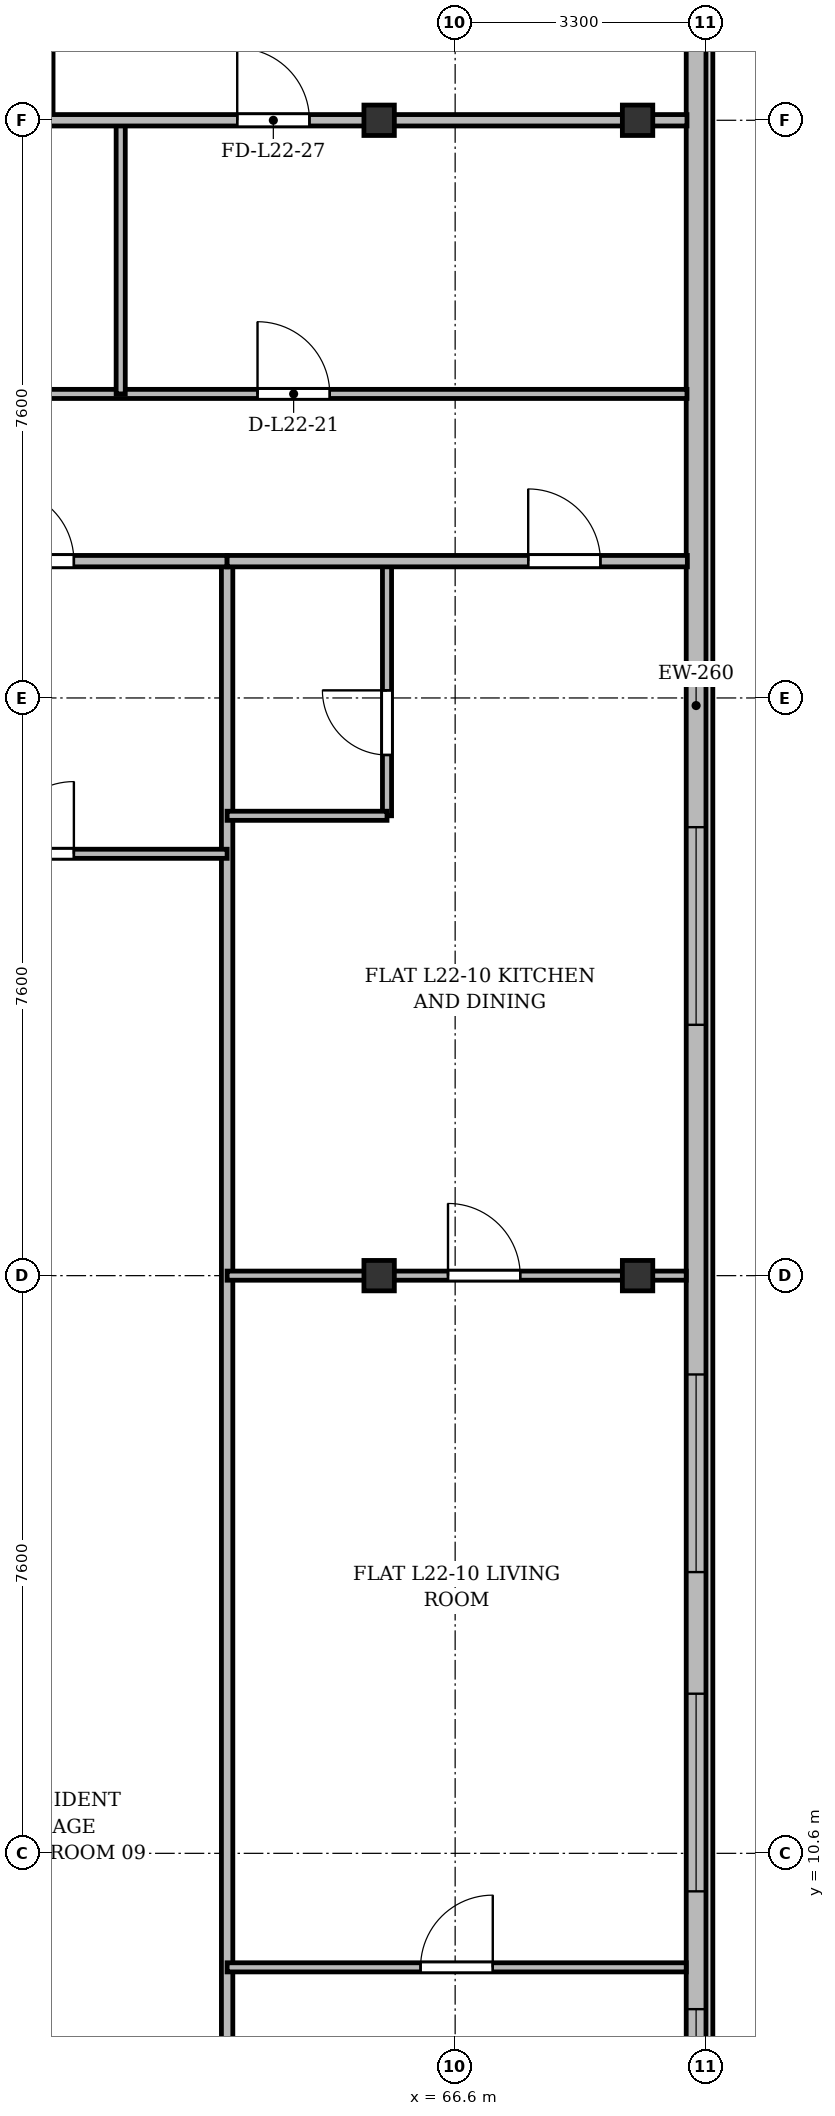
"""IFC4 building model, lengths in metres.
Left out: names, types, materials, properties, quantities, classifications, styles, units other than length and angle.
Written with IfcOpenShell. Run it as: python <this file> out.ifc"""

import sys

from ifc_helpers import new_model, si_unit, direction, frame, frame_2d, origin, origin_2d, place, context, subcontext, project, spatial, rectangle, i_section, extrude, source, transform, mapped, element, fill, save


model = new_model("IFC4")
c1 = context("Model", 3, precision=1e-05, world=origin(), true_north=direction((0.0, 1.0)))
c2 = subcontext(c1, "Body", "Model", "MODEL_VIEW")
j1 = project(units=[si_unit("LENGTHUNIT", "METRE"), si_unit("PLANEANGLEUNIT", "RADIAN")], contexts=[c1])
p1 = place(None, origin())
s1 = spatial("IfcSite", under=j1, at=p1, CompositionType="ELEMENT")
p2 = place(p1, origin())
s2 = spatial("IfcBuilding", under=s1, at=p2, CompositionType="ELEMENT")
p3 = place(p2, frame((0.0, 0.0, 88.9)))
s3 = spatial("IfcBuildingStorey", under=s2, at=p3, CompositionType="ELEMENT", Elevation=88.9)
m1 = source(origin(), c2, "Body", "SweptSolid", [
    extrude(i_section(OverallWidth=0.4, OverallDepth=0.4, WebThickness=0.022, FlangeThickness=0.035, at=origin_2d()), origin(), (0.0, 0.0, 1.0), 3.6),
])
for number, where, z_axis, x_axis in (
    (1, (65.6, 18.2, 0.0), (0.0, 0.0, 1.0), (1.0, 0.0, 0.0)),
    (2, (65.6, 33.4, 0.0), (0.0, 0.0, 1.0), (1.0, 0.0, 0.0)),
    (3, (69.0, 18.2, 0.0), (0.0, 0.0, 1.0), (1.0, 0.0, 0.0)),
    (4, (69.0, 33.4, 0.0), (0.0, 0.0, 1.0), (1.0, 0.0, 0.0)),
):
    element("IfcColumn", number, at=place(p3, frame(where, z_axis=z_axis, x_axis=x_axis)), inside=s3, PredefinedType="COLUMN", context=c2, shape_type="MappedRepresentation", body=[
        mapped(m1, transform((0.0, 0.0, 0.0), x_axis=(1.0, 0.0, 0.0), y_axis=(0.0, 1.0, 0.0), z_axis=(0.0, 0.0, 1.0), scale=1.0)),
    ])
p4 = place(p3, frame((69.77, 45.5, 0.0), z_axis=(0.0, 0.0, 1.0), x_axis=(0.0, -1.0, 0.0)))
e5 = element("IfcWall", 5, at=p4, inside=s3, PredefinedType="SOLIDWALL", context=c2, shape_type="SweptSolid", body=[
    extrude(rectangle(XDim=39.6, YDim=0.26, at=frame_2d((19.8, 0.0))), origin(), (0.0, 0.0, 1.0), 3.34),
])
p5 = place(p4, frame((36.95, 0.0, 0.92)))
e6 = element("IfcOpeningElement", 6, at=p5, cuts=e5, PredefinedType="OPENING", context=c2, shape_type="SweptSolid", body=[
    extrude(rectangle(XDim=1.2, YDim=1.65, at=frame_2d((0.6, 0.825))), frame((0.0, 0.14, 0.0), z_axis=(0.0, -1.0, 0.0), x_axis=(1.0, 0.0, 0.0)), (0.0, 0.0, 1.0), 0.28),
])
p6 = place(p4, frame((32.8, 0.0, 0.92)))
e7 = element("IfcOpeningElement", 7, at=p6, cuts=e5, PredefinedType="OPENING", context=c2, shape_type="SweptSolid", body=[
    extrude(rectangle(XDim=2.6, YDim=1.9, at=frame_2d((1.3, 0.95))), frame((0.0, 0.14, 0.0), z_axis=(0.0, -1.0, 0.0), x_axis=(1.0, 0.0, 0.0)), (0.0, 0.0, 1.0), 0.28),
])
p7 = place(p4, frame((28.6, 0.0, 0.92)))
e8 = element("IfcOpeningElement", 8, at=p7, cuts=e5, PredefinedType="OPENING", context=c2, shape_type="SweptSolid", body=[
    extrude(rectangle(XDim=2.6, YDim=1.9, at=frame_2d((1.3, 0.95))), frame((0.0, 0.14, 0.0), z_axis=(0.0, -1.0, 0.0), x_axis=(1.0, 0.0, 0.0)), (0.0, 0.0, 1.0), 0.28),
])
p8 = place(p4, frame((21.4, 0.0, 0.92)))
e9 = element("IfcOpeningElement", 9, at=p8, cuts=e5, PredefinedType="OPENING", context=c2, shape_type="SweptSolid", body=[
    extrude(rectangle(XDim=2.6, YDim=1.9, at=frame_2d((1.3, 0.95))), frame((0.0, 0.14, 0.0), z_axis=(0.0, -1.0, 0.0), x_axis=(1.0, 0.0, 0.0)), (0.0, 0.0, 1.0), 0.28),
])
p9 = place(p4, frame((7.4, 0.0, 0.92)))
e10 = element("IfcOpeningElement", 10, at=p9, cuts=e5, PredefinedType="OPENING", context=c2, shape_type="SweptSolid", body=[
    extrude(rectangle(XDim=2.6, YDim=1.9, at=frame_2d((1.3, 0.95))), frame((0.0, 0.14, 0.0), z_axis=(0.0, -1.0, 0.0), x_axis=(1.0, 0.0, 0.0)), (0.0, 0.0, 1.0), 0.28),
])
p10 = place(p4, frame((4.5, 0.0, 0.92)))
e11 = element("IfcOpeningElement", 11, at=p10, cuts=e5, PredefinedType="OPENING", context=c2, shape_type="SweptSolid", body=[
    extrude(rectangle(XDim=1.2, YDim=1.65, at=frame_2d((0.6, 0.825))), frame((0.0, 0.14, 0.0), z_axis=(0.0, -1.0, 0.0), x_axis=(1.0, 0.0, 0.0)), (0.0, 0.0, 1.0), 0.28),
])
p11 = place(p4, frame((1.15, 0.0, 0.92)))
e12 = element("IfcOpeningElement", 12, at=p11, cuts=e5, PredefinedType="OPENING", context=c2, shape_type="SweptSolid", body=[
    extrude(rectangle(XDim=1.2, YDim=1.65, at=frame_2d((0.6, 0.825))), frame((0.0, 0.14, 0.0), z_axis=(0.0, -1.0, 0.0), x_axis=(1.0, 0.0, 0.0)), (0.0, 0.0, 1.0), 0.28),
])
p12 = place(p3, frame((54.8, 29.8, 0.0), z_axis=(0.0, 0.0, 1.0), x_axis=(1.0, 0.0, 0.0)))
e13 = element("IfcWall", 13, at=p12, inside=s3, PredefinedType="PARTITIONING", context=c2, shape_type="SweptSolid", body=[
    extrude(rectangle(XDim=14.85, YDim=0.12, at=frame_2d((7.425, 0.0))), origin(), (0.0, 0.0, 1.0), 2.84),
])
p13 = place(p12, frame((2.5, 0.0, 0.0)))
e14 = element("IfcOpeningElement", 14, at=p13, cuts=e13, PredefinedType="OPENING", context=c2, shape_type="SweptSolid", body=[
    extrude(rectangle(XDim=0.95, YDim=2.15, at=frame_2d((0.475, 1.075))), frame((0.0, 0.07, 0.0), z_axis=(0.0, -1.0, 0.0), x_axis=(1.0, 0.0, 0.0)), (0.0, 0.0, 1.0), 0.14),
])
p14 = place(p12, frame((9.2, 0.0, 0.0)))
e15 = element("IfcOpeningElement", 15, at=p14, cuts=e13, PredefinedType="OPENING", context=c2, shape_type="SweptSolid", body=[
    extrude(rectangle(XDim=0.95, YDim=2.15, at=frame_2d((0.475, 1.075))), frame((0.0, 0.07, 0.0), z_axis=(0.0, -1.0, 0.0), x_axis=(1.0, 0.0, 0.0)), (0.0, 0.0, 1.0), 0.14),
])
p15 = place(p3, frame((62.2, 29.8, 0.0), z_axis=(0.0, 0.0, 1.0), x_axis=(0.0, 1.0, 0.0)))
e16 = element("IfcWall", 16, at=p15, inside=s3, PredefinedType="PARTITIONING", context=c2, shape_type="SweptSolid", body=[
    extrude(rectangle(XDim=3.6, YDim=0.12, at=frame_2d((1.8, 0.0))), origin(), (0.0, 0.0, 1.0), 2.752),
])
p16 = place(p3, frame((61.25, 33.4, 0.0), z_axis=(0.0, 0.0, 1.0), x_axis=(0.0, 1.0, 0.0)))
e17 = element("IfcWall", 17, at=p16, inside=s3, PredefinedType="PARTITIONING", context=c2, shape_type="SweptSolid", body=[
    extrude(rectangle(XDim=3.25, YDim=0.12, at=frame_2d((1.625, 0.0))), origin(), (0.0, 0.0, 1.0), 2.752),
])
p17 = place(p16, frame((0.9, 0.0, 0.0)))
e18 = element("IfcOpeningElement", 18, at=p17, cuts=e17, PredefinedType="OPENING", context=c2, shape_type="SweptSolid", body=[
    extrude(rectangle(XDim=0.85, YDim=2.1, at=frame_2d((0.425, 1.05))), frame((0.0, 0.07, 0.0), z_axis=(0.0, -1.0, 0.0), x_axis=(1.0, 0.0, 0.0)), (0.0, 0.0, 1.0), 0.14),
])
p18 = place(p3, frame((58.8, 33.4, 0.0), z_axis=(0.0, 0.0, 1.0), x_axis=(1.0, 0.0, 0.0)))
e19 = element("IfcWall", 19, at=p18, inside=s3, PredefinedType="PARTITIONING", context=c2, shape_type="SweptSolid", body=[
    extrude(rectangle(XDim=10.85, YDim=0.15, at=frame_2d((5.425, 0.0))), origin(), (0.0, 0.0, 1.0), 2.752),
])
p19 = place(p18, frame((4.933, 0.0, 0.0)))
e20 = element("IfcOpeningElement", 20, at=p19, cuts=e19, PredefinedType="OPENING", context=c2, shape_type="SweptSolid", body=[
    extrude(rectangle(XDim=0.95, YDim=2.15, at=frame_2d((0.475, 1.075))), frame((0.0, 0.085, 0.0), z_axis=(0.0, -1.0, 0.0), x_axis=(1.0, 0.0, 0.0)), (0.0, 0.0, 1.0), 0.17),
])
p20 = place(p3, frame((63.6, 3.145, 0.0), z_axis=(0.0, 0.0, 1.0), x_axis=(0.0, 1.0, 0.0)))
e21 = element("IfcWall", 21, at=p20, inside=s3, PredefinedType="PARTITIONING", context=c2, shape_type="SweptSolid", body=[
    extrude(rectangle(XDim=24.455, YDim=0.15, at=frame_2d((12.228, 0.0))), origin(), (0.0, 0.0, 1.0), 2.752),
])
p21 = place(p3, frame((58.8, 27.6, 0.0), z_axis=(0.0, 0.0, 1.0), x_axis=(1.0, 0.0, 0.0)))
e22 = element("IfcWall", 22, at=p21, inside=s3, PredefinedType="PARTITIONING", context=c2, shape_type="SweptSolid", body=[
    extrude(rectangle(XDim=4.8, YDim=0.15, at=frame_2d((2.4, 0.0))), origin(), (0.0, 0.0, 1.0), 2.84),
])
p22 = place(p21, frame((1.834, 0.0, 0.0)))
e23 = element("IfcOpeningElement", 23, at=p22, cuts=e22, PredefinedType="OPENING", context=c2, shape_type="SweptSolid", body=[
    extrude(rectangle(XDim=0.95, YDim=2.15, at=frame_2d((0.475, 1.075))), frame((0.0, 0.085, 0.0), z_axis=(0.0, -1.0, 0.0), x_axis=(1.0, 0.0, 0.0)), (0.0, 0.0, 1.0), 0.17),
])
p23 = place(p3, frame((58.8, 23.75, 0.0), z_axis=(0.0, 0.0, 1.0), x_axis=(1.0, 0.0, 0.0)))
e24 = element("IfcWall", 24, at=p23, inside=s3, PredefinedType="PARTITIONING", context=c2, shape_type="SweptSolid", body=[
    extrude(rectangle(XDim=4.8, YDim=0.12, at=frame_2d((2.4, 0.0))), origin(), (0.0, 0.0, 1.0), 2.84),
])
p24 = place(p23, frame((1.834, 0.0, 0.0)))
e25 = element("IfcOpeningElement", 25, at=p24, cuts=e24, PredefinedType="OPENING", context=c2, shape_type="SweptSolid", body=[
    extrude(rectangle(XDim=0.95, YDim=2.15, at=frame_2d((0.475, 1.075))), frame((0.0, 0.07, 0.0), z_axis=(0.0, -1.0, 0.0), x_axis=(1.0, 0.0, 0.0)), (0.0, 0.0, 1.0), 0.14),
])
p25 = place(p3, frame((63.6, 18.2, 0.0), z_axis=(0.0, 0.0, 1.0), x_axis=(1.0, 0.0, 0.0)))
e26 = element("IfcWall", 26, at=p25, inside=s3, PredefinedType="PARTITIONING", context=c2, shape_type="SweptSolid", body=[
    extrude(rectangle(XDim=6.04, YDim=0.12, at=frame_2d((3.02, 0.0))), origin(), (0.0, 0.0, 1.0), 2.752),
])
p26 = place(p25, frame((2.906, 0.0, 0.0)))
e27 = element("IfcOpeningElement", 27, at=p26, cuts=e26, PredefinedType="OPENING", context=c2, shape_type="SweptSolid", body=[
    extrude(rectangle(XDim=0.95, YDim=2.15, at=frame_2d((0.475, 1.075))), frame((0.0, 0.07, 0.0), z_axis=(0.0, -1.0, 0.0), x_axis=(1.0, 0.0, 0.0)), (0.0, 0.0, 1.0), 0.14),
])
p27 = place(p3, frame((65.704, 24.25, 0.0), z_axis=(0.0, 0.0, 1.0), x_axis=(0.0, 1.0, 0.0)))
e28 = element("IfcWall", 28, at=p27, inside=s3, PredefinedType="PARTITIONING", context=c2, shape_type="SweptSolid", body=[
    extrude(rectangle(XDim=3.35, YDim=0.12, at=frame_2d((1.675, 0.0))), origin(), (0.0, 0.0, 1.0), 2.84),
])
p28 = place(p27, frame((0.8, 0.0, 0.0)))
e29 = element("IfcOpeningElement", 29, at=p28, cuts=e28, PredefinedType="OPENING", context=c2, shape_type="SweptSolid", body=[
    extrude(rectangle(XDim=0.85, YDim=2.1, at=frame_2d((0.425, 1.05))), frame((0.0, 0.07, 0.0), z_axis=(0.0, -1.0, 0.0), x_axis=(1.0, 0.0, 0.0)), (0.0, 0.0, 1.0), 0.14),
])
p29 = place(p3, frame((63.6, 24.25, 0.0), z_axis=(0.0, 0.0, 1.0), x_axis=(1.0, 0.0, 0.0)))
e30 = element("IfcWall", 30, at=p29, inside=s3, PredefinedType="PARTITIONING", context=c2, shape_type="SweptSolid", body=[
    extrude(rectangle(XDim=2.104, YDim=0.12, at=frame_2d((1.052, 0.0))), origin(), (0.0, 0.0, 1.0), 2.84),
])
p30 = place(p3, frame((63.6, 27.6, 0.0), z_axis=(0.0, 0.0, 1.0), x_axis=(1.0, 0.0, 0.0)))
e31 = element("IfcWall", 31, at=p30, inside=s3, PredefinedType="PARTITIONING", context=c2, shape_type="SweptSolid", body=[
    extrude(rectangle(XDim=6.055, YDim=0.15, at=frame_2d((3.027, 0.0))), origin(), (0.0, 0.0, 1.0), 2.84),
])
p31 = place(p30, frame((3.961, 0.0, 0.0)))
e32 = element("IfcOpeningElement", 32, at=p31, cuts=e31, PredefinedType="OPENING", context=c2, shape_type="SweptSolid", body=[
    extrude(rectangle(XDim=0.95, YDim=2.15, at=frame_2d((0.475, 1.075))), frame((0.0, 0.085, 0.0), z_axis=(0.0, -1.0, 0.0), x_axis=(1.0, 0.0, 0.0)), (0.0, 0.0, 1.0), 0.17),
])
p32 = place(p3, frame((63.6, 9.1, 0.0), z_axis=(0.0, 0.0, 1.0), x_axis=(1.0, 0.0, 0.0)))
e33 = element("IfcWall", 33, at=p32, inside=s3, PredefinedType="PARTITIONING", context=c2, shape_type="SweptSolid", body=[
    extrude(rectangle(XDim=6.04, YDim=0.12, at=frame_2d((3.02, 0.0))), origin(), (0.0, 0.0, 1.0), 2.84),
])
p33 = place(p32, frame((2.545, 0.0, 0.0)))
e34 = element("IfcOpeningElement", 34, at=p33, cuts=e33, PredefinedType="OPENING", context=c2, shape_type="SweptSolid", body=[
    extrude(rectangle(XDim=0.95, YDim=2.15, at=frame_2d((0.475, 1.075))), frame((0.0, 0.07, 0.0), z_axis=(0.0, -1.0, 0.0), x_axis=(1.0, 0.0, 0.0)), (0.0, 0.0, 1.0), 0.14),
])
m2 = source(origin(), c2, "Body", "SweptSolid", [
    extrude(rectangle(XDim=1.2, YDim=1.65, at=frame_2d((0.6, 0.825))), frame((0.0, 0.03, 0.0), z_axis=(0.0, -1.0, 0.0), x_axis=(1.0, 0.0, 0.0)), (0.0, 0.0, 1.0), 0.06),
])
p34 = place(p5, origin())
e35 = element("IfcWindow", 35, at=p34, inside=s3, PartitioningType="SINGLE_PANEL", PredefinedType="WINDOW", context=c2, shape_type="MappedRepresentation", body=[
    mapped(m2, transform((0.0, 0.0, 0.0), x_axis=(1.0, 0.0, 0.0), y_axis=(0.0, 1.0, 0.0), z_axis=(0.0, 0.0, 1.0), scale=1.0)),
])
fill(e6, e35)
m3 = source(origin(), c2, "Body", "SweptSolid", [
    extrude(rectangle(XDim=2.6, YDim=1.9, at=frame_2d((1.3, 0.95))), frame((0.0, 0.03, 0.0), z_axis=(0.0, -1.0, 0.0), x_axis=(1.0, 0.0, 0.0)), (0.0, 0.0, 1.0), 0.06),
])
p35 = place(p6, origin())
e36 = element("IfcWindow", 36, at=p35, inside=s3, PartitioningType="SINGLE_PANEL", PredefinedType="WINDOW", context=c2, shape_type="MappedRepresentation", body=[
    mapped(m3, transform((0.0, 0.0, 0.0), x_axis=(1.0, 0.0, 0.0), y_axis=(0.0, 1.0, 0.0), z_axis=(0.0, 0.0, 1.0), scale=1.0)),
])
fill(e7, e36)
p36 = place(p7, origin())
e37 = element("IfcWindow", 37, at=p36, inside=s3, PartitioningType="SINGLE_PANEL", PredefinedType="WINDOW", context=c2, shape_type="MappedRepresentation", body=[
    mapped(m3, transform((0.0, 0.0, 0.0), x_axis=(1.0, 0.0, 0.0), y_axis=(0.0, 1.0, 0.0), z_axis=(0.0, 0.0, 1.0), scale=1.0)),
])
fill(e8, e37)
p37 = place(p8, origin())
e38 = element("IfcWindow", 38, at=p37, inside=s3, PartitioningType="SINGLE_PANEL", PredefinedType="WINDOW", context=c2, shape_type="MappedRepresentation", body=[
    mapped(m3, transform((0.0, 0.0, 0.0), x_axis=(1.0, 0.0, 0.0), y_axis=(0.0, 1.0, 0.0), z_axis=(0.0, 0.0, 1.0), scale=1.0)),
])
fill(e9, e38)
m4 = source(origin(), c2, "Body", "SweptSolid", [
    extrude(rectangle(XDim=0.95, YDim=2.15, at=frame_2d((0.475, 1.075))), frame((0.0, 0.025, 0.0), z_axis=(0.0, -1.0, 0.0), x_axis=(1.0, 0.0, 0.0)), (0.0, 0.0, 1.0), 0.05),
])
p38 = place(p14, origin())
e39 = element("IfcDoor", 39, at=p38, inside=s3, OperationType="SINGLE_SWING_LEFT", PredefinedType="DOOR", context=c2, shape_type="MappedRepresentation", body=[
    mapped(m4, transform((0.0, 0.0, 0.0), x_axis=(1.0, 0.0, 0.0), y_axis=(0.0, 1.0, 0.0), z_axis=(0.0, 0.0, 1.0), scale=1.0)),
])
fill(e15, e39)
p39 = place(p19, origin())
e40 = element("IfcDoor", 40, at=p39, inside=s3, OperationType="SINGLE_SWING_LEFT", PredefinedType="DOOR", context=c2, shape_type="MappedRepresentation", body=[
    mapped(m4, transform((0.0, 0.0, 0.0), x_axis=(1.0, 0.0, 0.0), y_axis=(0.0, 1.0, 0.0), z_axis=(0.0, 0.0, 1.0), scale=1.0)),
])
fill(e20, e40)
p40 = place(p22, origin())
e41 = element("IfcDoor", 41, at=p40, inside=s3, OperationType="SINGLE_SWING_LEFT", PredefinedType="DOOR", context=c2, shape_type="MappedRepresentation", body=[
    mapped(m4, transform((0.0, 0.0, 0.0), x_axis=(1.0, 0.0, 0.0), y_axis=(0.0, 1.0, 0.0), z_axis=(0.0, 0.0, 1.0), scale=1.0)),
])
fill(e23, e41)
p41 = place(p24, origin())
e42 = element("IfcDoor", 42, at=p41, inside=s3, OperationType="SINGLE_SWING_RIGHT", PredefinedType="DOOR", context=c2, shape_type="MappedRepresentation", body=[
    mapped(m4, transform((0.0, 0.0, 0.0), x_axis=(1.0, 0.0, 0.0), y_axis=(0.0, 1.0, 0.0), z_axis=(0.0, 0.0, 1.0), scale=1.0)),
])
fill(e25, e42)
p42 = place(p26, origin())
e43 = element("IfcDoor", 43, at=p42, inside=s3, OperationType="SINGLE_SWING_LEFT", PredefinedType="DOOR", context=c2, shape_type="MappedRepresentation", body=[
    mapped(m4, transform((0.0, 0.0, 0.0), x_axis=(1.0, 0.0, 0.0), y_axis=(0.0, 1.0, 0.0), z_axis=(0.0, 0.0, 1.0), scale=1.0)),
])
fill(e27, e43)
m5 = source(origin(), c2, "Body", "SweptSolid", [
    extrude(rectangle(XDim=0.85, YDim=2.1, at=frame_2d((0.425, 1.05))), frame((0.0, 0.025, 0.0), z_axis=(0.0, -1.0, 0.0), x_axis=(1.0, 0.0, 0.0)), (0.0, 0.0, 1.0), 0.05),
])
p43 = place(p28, origin())
e44 = element("IfcDoor", 44, at=p43, inside=s3, OperationType="SINGLE_SWING_RIGHT", PredefinedType="DOOR", context=c2, shape_type="MappedRepresentation", body=[
    mapped(m5, transform((0.0, 0.0, 0.0), x_axis=(1.0, 0.0, 0.0), y_axis=(0.0, 1.0, 0.0), z_axis=(0.0, 0.0, 1.0), scale=1.0)),
])
fill(e29, e44)
p44 = place(p31, origin())
e45 = element("IfcDoor", 45, at=p44, inside=s3, OperationType="SINGLE_SWING_LEFT", PredefinedType="DOOR", context=c2, shape_type="MappedRepresentation", body=[
    mapped(m4, transform((0.0, 0.0, 0.0), x_axis=(1.0, 0.0, 0.0), y_axis=(0.0, 1.0, 0.0), z_axis=(0.0, 0.0, 1.0), scale=1.0)),
])
fill(e32, e45)
p45 = place(p33, origin())
e46 = element("IfcDoor", 46, at=p45, inside=s3, OperationType="SINGLE_SWING_RIGHT", PredefinedType="DOOR", context=c2, shape_type="MappedRepresentation", body=[
    mapped(m4, transform((0.0, 0.0, 0.0), x_axis=(1.0, 0.0, 0.0), y_axis=(0.0, 1.0, 0.0), z_axis=(0.0, 0.0, 1.0), scale=1.0)),
])
fill(e34, e46)
save(model, sys.argv[1])
